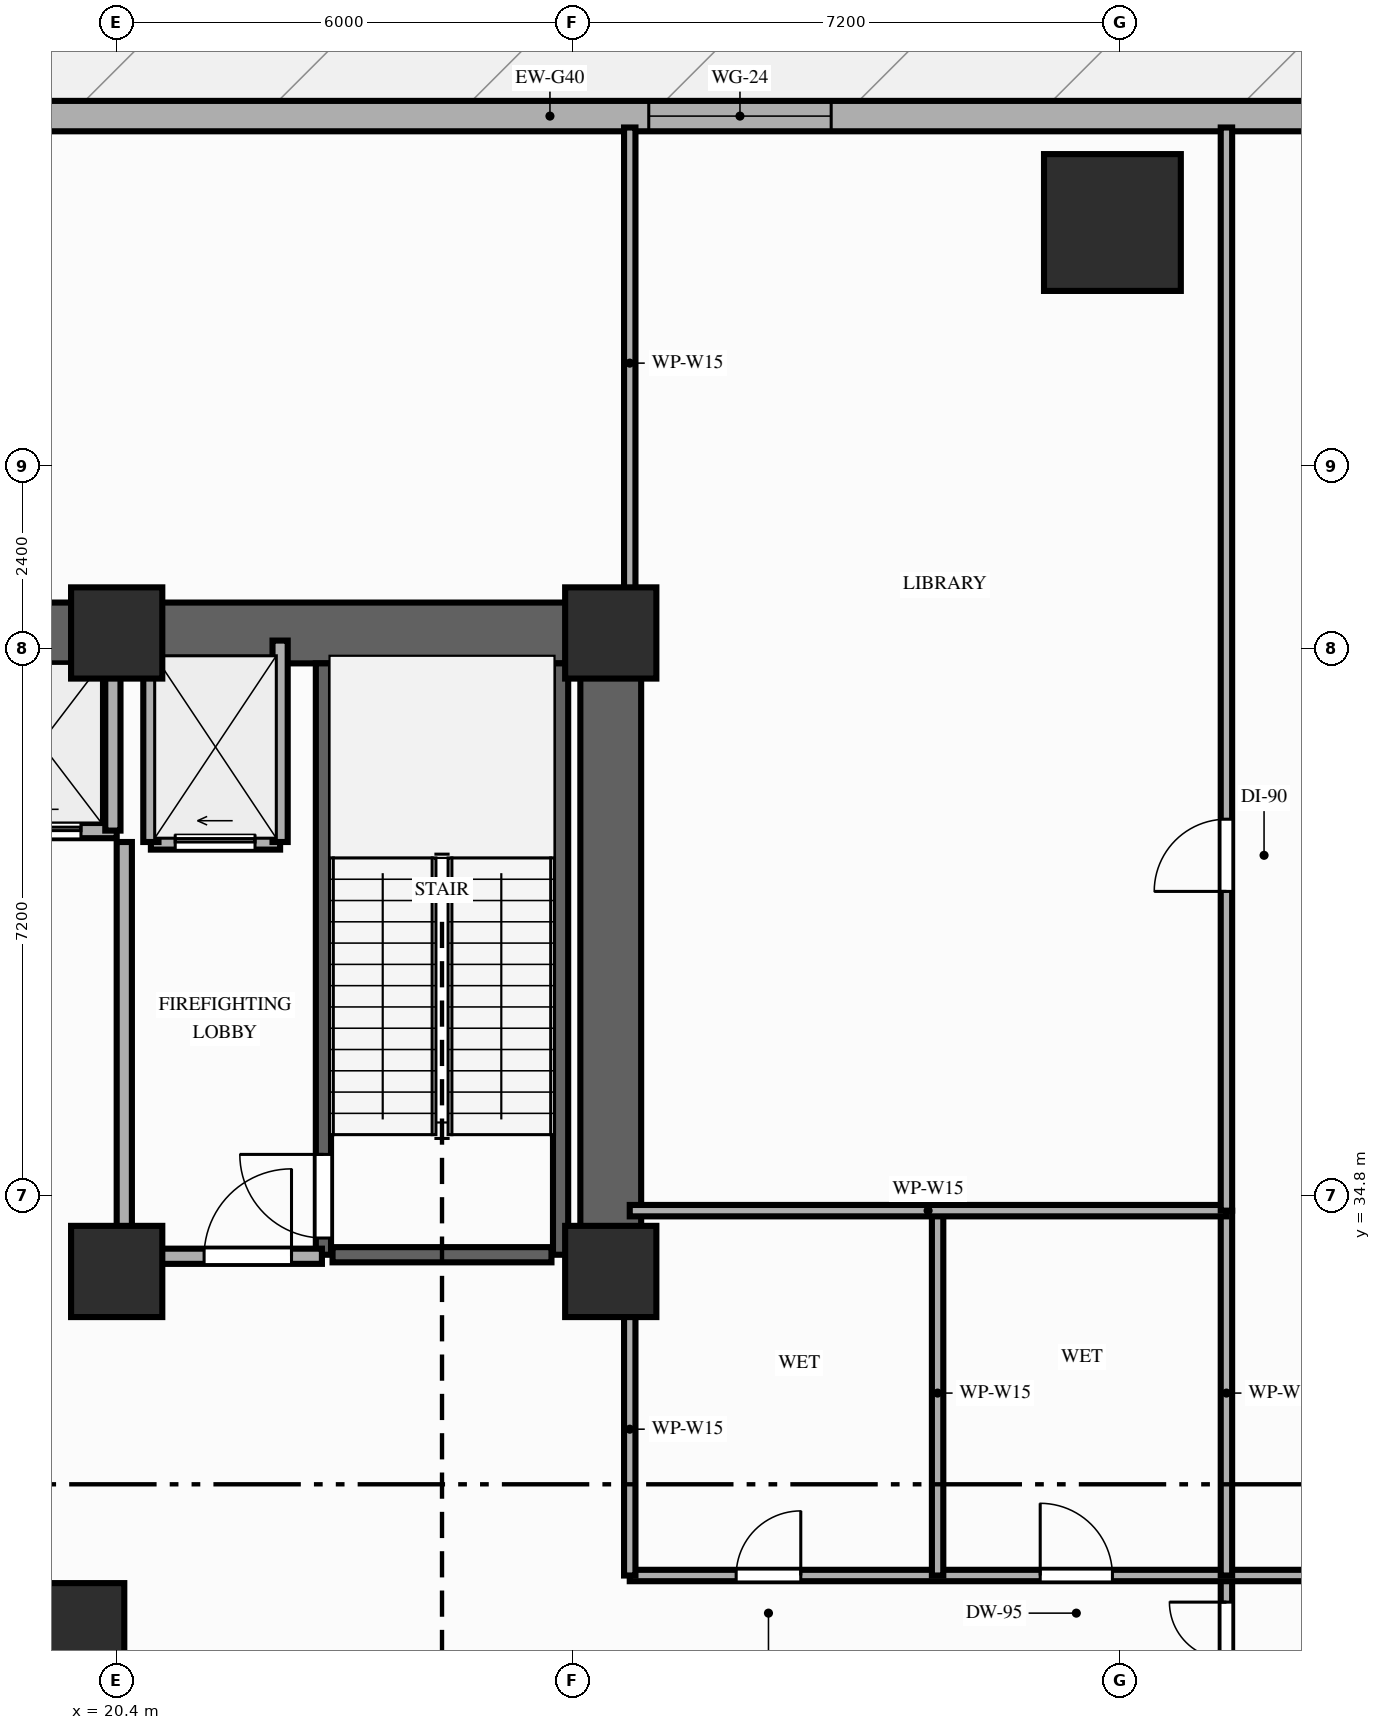
"""IFC4 building model, lengths in metres.
Left out: names, types, materials, properties, quantities, classifications, styles, units other than length and angle.
Written with IfcOpenShell. Run it as: python <this file> out.ifc"""

import sys

from ifc_helpers import new_model, si_unit, direction, frame, frame_2d, origin, origin_2d, place, context, subcontext, project, spatial, rectangle, extrude, element, fill, save


model = new_model("IFC4")
c1 = context("Model", 3, precision=1e-05, world=origin(), true_north=direction((0.0, 1.0)))
c2 = subcontext(c1, "Body", "Model", "MODEL_VIEW")
j1 = project(units=[si_unit("LENGTHUNIT", "METRE"), si_unit("PLANEANGLEUNIT", "RADIAN")], contexts=[c1])
p1 = place(None, origin())
s1 = spatial("IfcSite", under=j1, at=p1, CompositionType="ELEMENT")
p2 = place(p1, origin())
s2 = spatial("IfcBuilding", under=s1, at=p2, CompositionType="ELEMENT")
p3 = place(p2, origin())
s3 = spatial("IfcBuildingStorey", under=s2, at=p3, CompositionType="ELEMENT", Elevation=0.0)
for number, where, z_axis, x_axis in (
    (1, (20.4, 33.8, 0.0), (0.0, 0.0, 1.0), (1.0, 0.0, 0.0)),
    (2, (26.9, 33.8, 0.0), (0.0, 0.0, 1.0), (1.0, 0.0, 0.0)),
    (3, (20.4, 42.2, 0.0), (0.0, 0.0, 1.0), (1.0, 0.0, 0.0)),
    (4, (26.9, 42.2, 0.0), (0.0, 0.0, 1.0), (1.0, 0.0, 0.0)),
):
    element("IfcColumn", number, at=place(p3, frame(where, z_axis=z_axis, x_axis=x_axis)), inside=s3, PredefinedType="COLUMN", context=c2, shape_type="SweptSolid", body=[
        extrude(rectangle(XDim=1.2, YDim=1.2, at=origin_2d()), origin(), (0.0, 0.0, 1.0), 4.6),
    ])
for number, where, z_axis, x_axis in (
    (5, (19.6, 28.8, 0.0), (0.0, 0.0, 1.0), (1.0, 0.0, 0.0)),
    (6, (33.5, 47.6, 0.0), (0.0, 0.0, 1.0), (1.0, 0.0, 0.0)),
):
    element("IfcColumn", number, at=place(p3, frame(where, z_axis=z_axis, x_axis=x_axis)), inside=s3, PredefinedType="COLUMN", context=c2, shape_type="SweptSolid", body=[
        extrude(rectangle(XDim=1.8, YDim=1.8, at=origin_2d()), origin(), (0.0, 0.0, 1.0), 4.6),
    ])
p4 = place(p3, frame((48.6, 49.0, 0.0), z_axis=(0.0, 0.0, 1.0), x_axis=(-1.0, 0.0, 0.0)))
e7 = element("IfcWall", 7, at=p4, inside=s3, PredefinedType="STANDARD", context=c2, shape_type="SweptSolid", body=[
    extrude(rectangle(XDim=45.0, YDim=0.4, at=frame_2d((22.5, 0.0))), origin(), (0.0, 0.0, 1.0), 4.35),
])
p5 = place(p4, frame((18.8, 0.0, 0.9)))
e8 = element("IfcOpeningElement", 8, at=p5, cuts=e7, PredefinedType="OPENING", context=c2, shape_type="SweptSolid", body=[
    extrude(rectangle(XDim=2.4, YDim=2.15, at=frame_2d((1.2, 1.075))), frame((0.0, 0.21, 0.0), z_axis=(0.0, -1.0, 0.0), x_axis=(1.0, 0.0, 0.0)), (0.0, 0.0, 1.0), 0.42),
])
p6 = place(p4, frame((31.0, 0.0, 0.9)))
e9 = element("IfcOpeningElement", 9, at=p6, cuts=e7, PredefinedType="OPENING", context=c2, shape_type="SweptSolid", body=[
    extrude(rectangle(XDim=2.4, YDim=2.15, at=frame_2d((1.2, 1.075))), frame((0.0, 0.21, 0.0), z_axis=(0.0, -1.0, 0.0), x_axis=(1.0, 0.0, 0.0)), (0.0, 0.0, 1.0), 0.42),
])
p7 = place(p3, frame((6.45, 42.2, 0.0), z_axis=(0.0, 0.0, 1.0), x_axis=(1.0, 0.0, 0.0)))
e10 = element("IfcWall", 10, at=p7, inside=s3, PredefinedType="SHEAR", context=c2, shape_type="SweptSolid", body=[
    extrude(rectangle(XDim=20.45, YDim=0.8, at=frame_2d((10.225, 0.0))), origin(), (0.0, 0.0, 1.0), 4.35),
])
p8 = place(p3, frame((26.9, 33.8, 0.0), z_axis=(0.0, 0.0, 1.0), x_axis=(0.0, 1.0, 0.0)))
e11 = element("IfcWall", 11, at=p8, inside=s3, PredefinedType="SHEAR", context=c2, shape_type="SweptSolid", body=[
    extrude(rectangle(XDim=7.95, YDim=0.8, at=frame_2d((3.975, 0.0))), origin(), (0.0, 0.0, 1.0), 4.35),
])
p9 = place(p3, frame((23.12, 34.02, 0.0), z_axis=(0.0, 0.0, 1.0), x_axis=(0.0, 1.0, 0.0)))
e12 = element("IfcWall", 12, at=p9, inside=s3, PredefinedType="SHEAR", context=c2, shape_type="SweptSolid", body=[
    extrude(rectangle(XDim=7.78, YDim=0.2, at=frame_2d((3.89, 0.0))), origin(), (0.0, 0.0, 1.0), 4.35),
])
p10 = place(p9, frame((0.22, 0.0, 0.0)))
e13 = element("IfcOpeningElement", 13, at=p10, cuts=e12, PredefinedType="OPENING", context=c2, shape_type="SweptSolid", body=[
    extrude(rectangle(XDim=1.1, YDim=2.15, at=frame_2d((0.55, 1.075))), frame((0.0, 0.11, 0.0), z_axis=(0.0, -1.0, 0.0), x_axis=(1.0, 0.0, 0.0)), (0.0, 0.0, 1.0), 0.22),
])
p11 = place(p3, frame((26.24, 34.02, 0.0), z_axis=(0.0, 0.0, 1.0), x_axis=(0.0, 1.0, 0.0)))
e14 = element("IfcWall", 14, at=p11, inside=s3, PredefinedType="SHEAR", context=c2, shape_type="SweptSolid", body=[
    extrude(rectangle(XDim=7.78, YDim=0.2, at=frame_2d((3.89, 0.0))), origin(), (0.0, 0.0, 1.0), 4.35),
])
p12 = place(p3, frame((23.24, 34.02, 0.0), z_axis=(0.0, 0.0, 1.0), x_axis=(1.0, 0.0, 0.0)))
e15 = element("IfcWall", 15, at=p12, inside=s3, PredefinedType="SHEAR", context=c2, shape_type="SweptSolid", body=[
    extrude(rectangle(XDim=2.88, YDim=0.2, at=frame_2d((1.44, 0.0))), origin(), (0.0, 0.0, 1.0), 4.35),
])
p13 = place(p3, frame((20.85, 39.45, 0.0), z_axis=(0.0, 0.0, 1.0), x_axis=(1.0, 0.0, 0.0)))
e16 = element("IfcWall", 16, at=p13, inside=s3, PredefinedType="MOVABLE", context=c2, shape_type="SweptSolid", body=[
    extrude(rectangle(XDim=1.7, YDim=0.2, at=frame_2d((0.85, 0.0))), origin(), (0.0, 0.0, 1.0), 4.35),
])
p14 = place(p13, frame((0.32, 0.0, 0.0)))
e17 = element("IfcOpeningElement", 17, at=p14, cuts=e16, PredefinedType="OPENING", context=c2, shape_type="SweptSolid", body=[
    extrude(rectangle(XDim=1.05, YDim=2.15, at=frame_2d((0.525, 1.075))), frame((0.0, 0.11, 0.0), z_axis=(0.0, -1.0, 0.0), x_axis=(1.0, 0.0, 0.0)), (0.0, 0.0, 1.0), 0.22),
])
for number, where, z_axis, x_axis in (
    (18, (20.85, 39.45, 0.0), (0.0, 0.0, 1.0), (0.0, 1.0, 0.0)),
    (19, (22.55, 39.45, 0.0), (0.0, 0.0, 1.0), (0.0, 1.0, 0.0)),
):
    element("IfcWall", number, at=place(p3, frame(where, z_axis=z_axis, x_axis=x_axis)), inside=s3, PredefinedType="MOVABLE", context=c2, shape_type="SweptSolid", body=[
        extrude(rectangle(XDim=2.65, YDim=0.2, at=frame_2d((1.325, 0.0))), origin(), (0.0, 0.0, 1.0), 4.35),
    ])
p15 = place(p3, frame((20.5, 34.0, 0.0), z_axis=(0.0, 0.0, 1.0), x_axis=(0.0, 1.0, 0.0)))
e20 = element("IfcWall", 20, at=p15, inside=s3, PredefinedType="PARTITIONING", context=c2, shape_type="SweptSolid", body=[
    extrude(rectangle(XDim=5.45, YDim=0.2, at=frame_2d((2.725, 0.0))), origin(), (0.0, 0.0, 1.0), 3.63),
])
p16 = place(p3, frame((20.5, 34.0, 0.0), z_axis=(0.0, 0.0, 1.0), x_axis=(1.0, 0.0, 0.0)))
e21 = element("IfcWall", 21, at=p16, inside=s3, PredefinedType="PARTITIONING", context=c2, shape_type="SweptSolid", body=[
    extrude(rectangle(XDim=2.6, YDim=0.2, at=frame_2d((1.3, 0.0))), origin(), (0.0, 0.0, 1.0), 3.63),
])
p17 = place(p16, frame((1.05, 0.0, 0.0)))
e22 = element("IfcOpeningElement", 22, at=p17, cuts=e21, PredefinedType="OPENING", context=c2, shape_type="SweptSolid", body=[
    extrude(rectangle(XDim=1.15, YDim=2.15, at=frame_2d((0.575, 1.075))), frame((0.0, 0.11, 0.0), z_axis=(0.0, -1.0, 0.0), x_axis=(1.0, 0.0, 0.0)), (0.0, 0.0, 1.0), 0.22),
])
p18 = place(p3, frame((13.0, 39.6, 0.0), z_axis=(0.0, 0.0, 1.0), x_axis=(1.0, 0.0, 0.0)))
e23 = element("IfcWall", 23, at=p18, inside=s3, PredefinedType="MOVABLE", context=c2, shape_type="SweptSolid", body=[
    extrude(rectangle(XDim=7.4, YDim=0.2, at=frame_2d((3.7, 0.0))), origin(), (0.0, 0.0, 1.0), 4.35),
])
p19 = place(p18, frame((0.47, 0.0, 0.0)))
e24 = element("IfcOpeningElement", 24, at=p19, cuts=e23, PredefinedType="OPENING", context=c2, shape_type="SweptSolid", body=[
    extrude(rectangle(XDim=1.05, YDim=2.15, at=frame_2d((0.525, 1.075))), frame((0.0, 0.11, 0.0), z_axis=(0.0, -1.0, 0.0), x_axis=(1.0, 0.0, 0.0)), (0.0, 0.0, 1.0), 0.22),
])
p20 = place(p18, frame((2.28, 0.0, 0.0)))
e25 = element("IfcOpeningElement", 25, at=p20, cuts=e23, PredefinedType="OPENING", context=c2, shape_type="SweptSolid", body=[
    extrude(rectangle(XDim=1.05, YDim=2.15, at=frame_2d((0.525, 1.075))), frame((0.0, 0.11, 0.0), z_axis=(0.0, -1.0, 0.0), x_axis=(1.0, 0.0, 0.0)), (0.0, 0.0, 1.0), 0.22),
])
p21 = place(p18, frame((4.08, 0.0, 0.0)))
e26 = element("IfcOpeningElement", 26, at=p21, cuts=e23, PredefinedType="OPENING", context=c2, shape_type="SweptSolid", body=[
    extrude(rectangle(XDim=1.05, YDim=2.15, at=frame_2d((0.525, 1.075))), frame((0.0, 0.11, 0.0), z_axis=(0.0, -1.0, 0.0), x_axis=(1.0, 0.0, 0.0)), (0.0, 0.0, 1.0), 0.22),
])
p22 = place(p18, frame((5.88, 0.0, 0.0)))
e27 = element("IfcOpeningElement", 27, at=p22, cuts=e23, PredefinedType="OPENING", context=c2, shape_type="SweptSolid", body=[
    extrude(rectangle(XDim=1.05, YDim=2.15, at=frame_2d((0.525, 1.075))), frame((0.0, 0.11, 0.0), z_axis=(0.0, -1.0, 0.0), x_axis=(1.0, 0.0, 0.0)), (0.0, 0.0, 1.0), 0.22),
])
p23 = place(p3, frame((20.35, 39.6, 0.0), z_axis=(0.0, 0.0, 1.0), x_axis=(0.0, 1.0, 0.0)))
e28 = element("IfcWall", 28, at=p23, inside=s3, PredefinedType="MOVABLE", context=c2, shape_type="SweptSolid", body=[
    extrude(rectangle(XDim=2.18, YDim=0.2, at=frame_2d((1.09, 0.0))), origin(), (0.0, 0.0, 1.0), 4.35),
])
p24 = place(p3, frame((35.0, 27.6, 0.0), z_axis=(0.0, 0.0, 1.0), x_axis=(0.0, 1.0, 0.0)))
e29 = element("IfcWall", 29, at=p24, inside=s3, PredefinedType="PARTITIONING", context=c2, shape_type="SweptSolid", body=[
    extrude(rectangle(XDim=2.2, YDim=0.15, at=frame_2d((1.1, 0.0))), origin(), (0.0, 0.0, 1.0), 3.63),
])
p25 = place(p24, frame((0.35, 0.0, 0.0)))
e30 = element("IfcOpeningElement", 30, at=p25, cuts=e29, PredefinedType="OPENING", context=c2, shape_type="SweptSolid", body=[
    extrude(rectangle(XDim=1.5, YDim=2.18, at=frame_2d((0.75, 1.09))), frame((0.0, 0.085, 0.0), z_axis=(0.0, -1.0, 0.0), x_axis=(1.0, 0.0, 0.0)), (0.0, 0.0, 1.0), 0.17),
])
p26 = place(p3, frame((27.15, 29.8, 0.0), z_axis=(0.0, 0.0, 1.0), x_axis=(1.0, 0.0, 0.0)))
e31 = element("IfcWall", 31, at=p26, inside=s3, PredefinedType="PARTITIONING", context=c2, shape_type="SweptSolid", body=[
    extrude(rectangle(XDim=35.25, YDim=0.15, at=frame_2d((17.625, 0.0))), origin(), (0.0, 0.0, 1.0), 3.63),
])
p27 = place(p26, frame((1.4, 0.0, 0.0)))
e32 = element("IfcOpeningElement", 32, at=p27, cuts=e31, PredefinedType="OPENING", context=c2, shape_type="SweptSolid", body=[
    extrude(rectangle(XDim=0.85, YDim=2.1, at=frame_2d((0.425, 1.05))), frame((0.0, 0.085, 0.0), z_axis=(0.0, -1.0, 0.0), x_axis=(1.0, 0.0, 0.0)), (0.0, 0.0, 1.0), 0.17),
])
p28 = place(p26, frame((5.4, 0.0, 0.0)))
e33 = element("IfcOpeningElement", 33, at=p28, cuts=e31, PredefinedType="OPENING", context=c2, shape_type="SweptSolid", body=[
    extrude(rectangle(XDim=0.95, YDim=2.1, at=frame_2d((0.475, 1.05))), frame((0.0, 0.085, 0.0), z_axis=(0.0, -1.0, 0.0), x_axis=(1.0, 0.0, 0.0)), (0.0, 0.0, 1.0), 0.17),
])
p29 = place(p26, frame((12.6, 0.0, 0.0)))
e34 = element("IfcOpeningElement", 34, at=p29, cuts=e31, PredefinedType="OPENING", context=c2, shape_type="SweptSolid", body=[
    extrude(rectangle(XDim=1.0, YDim=2.15, at=frame_2d((0.5, 1.075))), frame((0.0, 0.085, 0.0), z_axis=(0.0, -1.0, 0.0), x_axis=(1.0, 0.0, 0.0)), (0.0, 0.0, 1.0), 0.17),
])
p30 = place(p3, frame((27.15, 29.8, 0.0), z_axis=(0.0, 0.0, 1.0), x_axis=(0.0, 1.0, 0.0)))
e35 = element("IfcWall", 35, at=p30, inside=s3, PredefinedType="PARTITIONING", context=c2, shape_type="SweptSolid", body=[
    extrude(rectangle(XDim=3.85, YDim=0.15, at=frame_2d((1.925, 0.0))), origin(), (0.0, 0.0, 1.0), 3.63),
])
p31 = place(p3, frame((27.15, 42.65, 0.0), z_axis=(0.0, 0.0, 1.0), x_axis=(0.0, 1.0, 0.0)))
e36 = element("IfcWall", 36, at=p31, inside=s3, PredefinedType="PARTITIONING", context=c2, shape_type="SweptSolid", body=[
    extrude(rectangle(XDim=6.2, YDim=0.15, at=frame_2d((3.1, 0.0))), origin(), (0.0, 0.0, 1.0), 4.35),
])
for number, where, z_axis, x_axis in (
    (37, (31.2, 29.8, 0.0), (0.0, 0.0, 1.0), (0.0, 1.0, 0.0)),
    (38, (35.0, 29.8, 0.0), (0.0, 0.0, 1.0), (0.0, 1.0, 0.0)),
):
    element("IfcWall", number, at=place(p3, frame(where, z_axis=z_axis, x_axis=x_axis)), inside=s3, PredefinedType="PARTITIONING", context=c2, shape_type="SweptSolid", body=[
        extrude(rectangle(XDim=4.8, YDim=0.15, at=frame_2d((2.4, 0.0))), origin(), (0.0, 0.0, 1.0), 4.35),
    ])
p32 = place(p3, frame((27.15, 34.6, 0.0), z_axis=(0.0, 0.0, 1.0), x_axis=(1.0, 0.0, 0.0)))
e39 = element("IfcWall", 39, at=p32, inside=s3, PredefinedType="PARTITIONING", context=c2, shape_type="SweptSolid", body=[
    extrude(rectangle(XDim=7.85, YDim=0.15, at=frame_2d((3.925, 0.0))), origin(), (0.0, 0.0, 1.0), 3.63),
])
p33 = place(p3, frame((35.0, 34.6, 0.0), z_axis=(0.0, 0.0, 1.0), x_axis=(0.0, 1.0, 0.0)))
e40 = element("IfcWall", 40, at=p33, inside=s3, PredefinedType="PARTITIONING", context=c2, shape_type="SweptSolid", body=[
    extrude(rectangle(XDim=14.25, YDim=0.15, at=frame_2d((7.125, 0.0))), origin(), (0.0, 0.0, 1.0), 3.63),
])
p34 = place(p33, frame((4.2, 0.0, 0.0)))
e41 = element("IfcOpeningElement", 41, at=p34, cuts=e40, PredefinedType="OPENING", context=c2, shape_type="SweptSolid", body=[
    extrude(rectangle(XDim=0.95, YDim=2.15, at=frame_2d((0.475, 1.075))), frame((0.0, 0.085, 0.0), z_axis=(0.0, -1.0, 0.0), x_axis=(1.0, 0.0, 0.0)), (0.0, 0.0, 1.0), 0.17),
])
p35 = place(p5, origin())
e42 = element("IfcWindow", 42, at=p35, inside=s3, PartitioningType="SINGLE_PANEL", PredefinedType="WINDOW", context=c2, shape_type="SweptSolid", body=[
    extrude(rectangle(XDim=2.4, YDim=2.15, at=frame_2d((1.2, 1.075))), frame((0.0, 0.03, 0.0), z_axis=(0.0, -1.0, 0.0), x_axis=(1.0, 0.0, 0.0)), (0.0, 0.0, 1.0), 0.06),
])
fill(e8, e42)
p36 = place(p10, origin())
e43 = element("IfcDoor", 43, at=p36, inside=s3, OperationType="SINGLE_SWING_RIGHT", PredefinedType="DOOR", context=c2, shape_type="SweptSolid", body=[
    extrude(rectangle(XDim=1.1, YDim=2.15, at=frame_2d((0.55, 1.075))), frame((0.0, 0.025, 0.0), z_axis=(0.0, -1.0, 0.0), x_axis=(1.0, 0.0, 0.0)), (0.0, 0.0, 1.0), 0.05),
])
fill(e13, e43)
p37 = place(p14, origin())
e44 = element("IfcDoor", 44, at=p37, inside=s3, OperationType="SLIDING_TO_LEFT", PredefinedType="DOOR", context=c2, shape_type="SweptSolid", body=[
    extrude(rectangle(XDim=1.05, YDim=2.15, at=frame_2d((0.525, 1.075))), frame((0.0, 0.025, 0.0), z_axis=(0.0, -1.0, 0.0), x_axis=(1.0, 0.0, 0.0)), (0.0, 0.0, 1.0), 0.05),
])
fill(e17, e44)
p38 = place(p17, origin())
e45 = element("IfcDoor", 45, at=p38, inside=s3, OperationType="SINGLE_SWING_RIGHT", PredefinedType="DOOR", context=c2, shape_type="SweptSolid", body=[
    extrude(rectangle(XDim=1.15, YDim=2.15, at=frame_2d((0.575, 1.075))), frame((0.0, 0.025, 0.0), z_axis=(0.0, -1.0, 0.0), x_axis=(1.0, 0.0, 0.0)), (0.0, 0.0, 1.0), 0.05),
])
fill(e22, e45)
p39 = place(p22, origin())
e46 = element("IfcDoor", 46, at=p39, inside=s3, OperationType="SLIDING_TO_LEFT", PredefinedType="DOOR", context=c2, shape_type="SweptSolid", body=[
    extrude(rectangle(XDim=1.05, YDim=2.15, at=frame_2d((0.525, 1.075))), frame((0.0, 0.025, 0.0), z_axis=(0.0, -1.0, 0.0), x_axis=(1.0, 0.0, 0.0)), (0.0, 0.0, 1.0), 0.05),
])
fill(e27, e46)
p40 = place(p25, origin())
e47 = element("IfcDoor", 47, at=p40, inside=s3, OperationType="DOUBLE_DOOR_SINGLE_SWING", PredefinedType="DOOR", context=c2, shape_type="SweptSolid", body=[
    extrude(rectangle(XDim=1.5, YDim=2.18, at=frame_2d((0.75, 1.09))), frame((0.0, 0.025, 0.0), z_axis=(0.0, -1.0, 0.0), x_axis=(1.0, 0.0, 0.0)), (0.0, 0.0, 1.0), 0.05),
])
fill(e30, e47)
p41 = place(p27, origin())
e48 = element("IfcDoor", 48, at=p41, inside=s3, OperationType="SINGLE_SWING_RIGHT", PredefinedType="DOOR", context=c2, shape_type="SweptSolid", body=[
    extrude(rectangle(XDim=0.85, YDim=2.1, at=frame_2d((0.425, 1.05))), frame((0.0, 0.025, 0.0), z_axis=(0.0, -1.0, 0.0), x_axis=(1.0, 0.0, 0.0)), (0.0, 0.0, 1.0), 0.05),
])
fill(e32, e48)
p42 = place(p28, origin())
e49 = element("IfcDoor", 49, at=p42, inside=s3, OperationType="SINGLE_SWING_LEFT", PredefinedType="DOOR", context=c2, shape_type="SweptSolid", body=[
    extrude(rectangle(XDim=0.95, YDim=2.1, at=frame_2d((0.475, 1.05))), frame((0.0, 0.025, 0.0), z_axis=(0.0, -1.0, 0.0), x_axis=(1.0, 0.0, 0.0)), (0.0, 0.0, 1.0), 0.05),
])
fill(e33, e49)
p43 = place(p34, origin())
e50 = element("IfcDoor", 50, at=p43, inside=s3, OperationType="SINGLE_SWING_LEFT", PredefinedType="DOOR", context=c2, shape_type="SweptSolid", body=[
    extrude(rectangle(XDim=0.95, YDim=2.15, at=frame_2d((0.475, 1.075))), frame((0.0, 0.025, 0.0), z_axis=(0.0, -1.0, 0.0), x_axis=(1.0, 0.0, 0.0)), (0.0, 0.0, 1.0), 0.05),
])
fill(e41, e50)
save(model, sys.argv[1])
